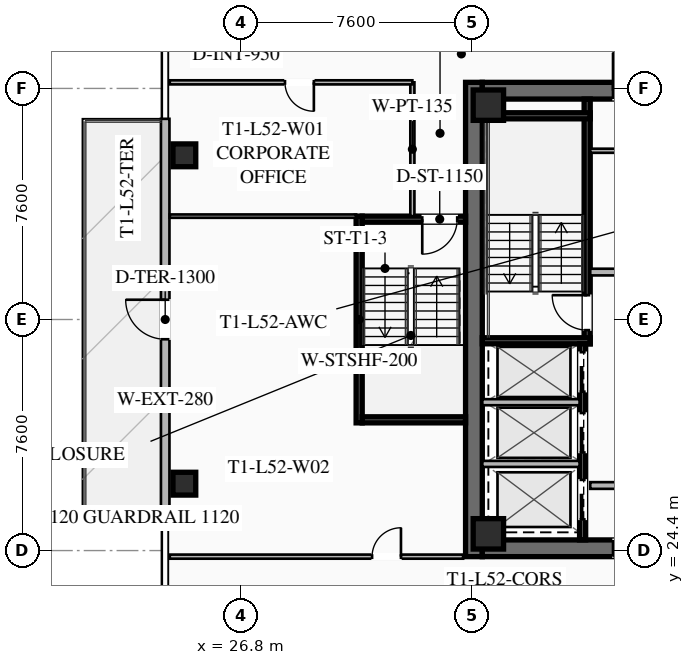
"""IFC4 building model, lengths in metres.
Left out: names, types, materials, properties, quantities, classifications, styles, units other than length and angle.
Written with IfcOpenShell. Run it as: python <this file> out.ifc"""

import sys

from ifc_helpers import new_model, si_unit, direction, frame, frame_2d, origin, origin_2d, place, context, subcontext, project, spatial, rectangle, hollow_rectangle, extrude, element, fill, save


model = new_model("IFC4")
c1 = context("Model", 3, precision=1e-05, world=origin(), true_north=direction((0.0, 1.0)))
c2 = subcontext(c1, "Body", "Model", "MODEL_VIEW")
j1 = project(units=[si_unit("LENGTHUNIT", "METRE"), si_unit("PLANEANGLEUNIT", "RADIAN")], contexts=[c1])
p1 = place(None, origin())
s1 = spatial("IfcSite", under=j1, at=p1, CompositionType="ELEMENT")
p2 = place(p1, origin())
s2 = spatial("IfcBuilding", under=s1, at=p2, CompositionType="ELEMENT")
p3 = place(p2, frame((0.0, 0.0, 192.5)))
s3 = spatial("IfcBuildingStorey", under=s2, at=p3, CompositionType="ELEMENT", Elevation=192.5)
p4 = place(p3, frame((34.475, 24.2, 0.0), z_axis=(0.0, 0.0, 1.0), x_axis=(0.0, 1.0, 0.0)))
e1 = element("IfcWall", 1, at=p4, inside=s3, PredefinedType="SHEAR", context=c2, shape_type="SweptSolid", body=[
    extrude(rectangle(XDim=15.6, YDim=0.55, at=frame_2d((7.8, 0.0))), origin(), (0.0, 0.0, 1.0), 3.55),
])
p5 = place(p3, frame((49.25, 24.475, 0.0), z_axis=(0.0, 0.0, 1.0), x_axis=(-1.0, 0.0, 0.0)))
e2 = element("IfcWall", 2, at=p5, inside=s3, PredefinedType="SHEAR", context=c2, shape_type="SweptSolid", body=[
    extrude(rectangle(XDim=14.5, YDim=0.55, at=frame_2d((7.25, 0.0))), origin(), (0.0, 0.0, 1.0), 3.55),
])
p6 = place(p5, frame((8.95, 0.0, 0.0)))
e3 = element("IfcOpeningElement", 3, at=p6, cuts=e2, PredefinedType="OPENING", context=c2, shape_type="SweptSolid", body=[
    extrude(rectangle(XDim=1.25, YDim=2.25, at=frame_2d((0.625, 1.125))), frame((0.0, 0.285, 0.0), z_axis=(0.0, -1.0, 0.0), x_axis=(1.0, 0.0, 0.0)), (0.0, 0.0, 1.0), 0.57),
])
p7 = place(p5, frame((3.9, 0.0, 0.0)))
e4 = element("IfcOpeningElement", 4, at=p7, cuts=e2, PredefinedType="OPENING", context=c2, shape_type="SweptSolid", body=[
    extrude(rectangle(XDim=1.25, YDim=2.25, at=frame_2d((0.625, 1.125))), frame((0.0, 0.285, 0.0), z_axis=(0.0, -1.0, 0.0), x_axis=(1.0, 0.0, 0.0)), (0.0, 0.0, 1.0), 0.57),
])
p8 = place(p3, frame((34.75, 39.525, 0.0), z_axis=(0.0, 0.0, 1.0), x_axis=(1.0, 0.0, 0.0)))
e5 = element("IfcWall", 5, at=p8, inside=s3, PredefinedType="SHEAR", context=c2, shape_type="SweptSolid", body=[
    extrude(rectangle(XDim=14.5, YDim=0.55, at=frame_2d((7.25, 0.0))), origin(), (0.0, 0.0, 1.0), 3.55),
])
p9 = place(p8, frame((4.3, 0.0, 0.0)))
e6 = element("IfcOpeningElement", 6, at=p9, cuts=e5, PredefinedType="OPENING", context=c2, shape_type="SweptSolid", body=[
    extrude(rectangle(XDim=1.25, YDim=2.25, at=frame_2d((0.625, 1.125))), frame((0.0, 0.285, 0.0), z_axis=(0.0, -1.0, 0.0), x_axis=(1.0, 0.0, 0.0)), (0.0, 0.0, 1.0), 0.57),
])
p10 = place(p8, frame((9.35, 0.0, 0.0)))
e7 = element("IfcOpeningElement", 7, at=p10, cuts=e5, PredefinedType="OPENING", context=c2, shape_type="SweptSolid", body=[
    extrude(rectangle(XDim=1.25, YDim=2.25, at=frame_2d((0.625, 1.125))), frame((0.0, 0.285, 0.0), z_axis=(0.0, -1.0, 0.0), x_axis=(1.0, 0.0, 0.0)), (0.0, 0.0, 1.0), 0.57),
])
for number, where, z_axis, x_axis in (
    (8, (34.95, 24.95, 0.0), (0.0, 0.0, 1.0), (1.0, 0.0, 0.0)),
    (9, (34.95, 39.05, 0.0), (0.0, 0.0, 1.0), (1.0, 0.0, 0.0)),
):
    element("IfcColumn", number, at=place(p3, frame(where, z_axis=z_axis, x_axis=x_axis)), inside=s3, PredefinedType="COLUMN", context=c2, shape_type="SweptSolid", body=[
        extrude(hollow_rectangle(XDim=1.0, YDim=1.0, WallThickness=0.04, at=origin_2d()), origin(), (0.0, 0.0, 1.0), 3.37),
    ])
for number, where, z_axis, x_axis in (
    (10, (24.95, 37.4, 0.0), (0.0, 0.0, 1.0), (1.0, 0.0, 0.0)),
    (11, (24.95, 26.6, 0.0), (0.0, 0.0, 1.0), (1.0, 0.0, 0.0)),
):
    element("IfcColumn", number, at=place(p3, frame(where, z_axis=z_axis, x_axis=x_axis)), inside=s3, PredefinedType="COLUMN", context=c2, shape_type="SweptSolid", body=[
        extrude(hollow_rectangle(XDim=0.75, YDim=0.75, WallThickness=0.032, at=origin_2d()), origin(), (0.0, 0.0, 1.0), 3.37),
    ])
p11 = place(p3, frame((24.32, 25.4, 0.0), z_axis=(0.0, 0.0, 1.0), x_axis=(0.0, 1.0, 0.0)))
e12 = element("IfcWall", 12, at=p11, inside=s3, PredefinedType="SOLIDWALL", context=c2, shape_type="SweptSolid", body=[
    extrude(rectangle(XDim=13.2, YDim=0.28, at=frame_2d((6.6, 0.0))), origin(), (0.0, 0.0, 1.0), 3.37),
])
p12 = place(p11, frame((5.95, 0.0, 0.0)))
e13 = element("IfcOpeningElement", 13, at=p12, cuts=e12, PredefinedType="OPENING", context=c2, shape_type="SweptSolid", body=[
    extrude(rectangle(XDim=1.3, YDim=2.15, at=frame_2d((0.65, 1.075))), frame((0.0, 0.15, 0.0), z_axis=(0.0, -1.0, 0.0), x_axis=(1.0, 0.0, 0.0)), (0.0, 0.0, 1.0), 0.3),
])
p13 = place(p3, frame((38.2, 31.2, 0.0), z_axis=(0.0, 0.0, 1.0), x_axis=(0.0, 1.0, 0.0)))
e14 = element("IfcWall", 14, at=p13, inside=s3, PredefinedType="SHEAR", context=c2, shape_type="SweptSolid", body=[
    extrude(rectangle(XDim=8.05, YDim=0.2, at=frame_2d((4.025, 0.0))), origin(), (0.0, 0.0, 1.0), 3.37),
])
p14 = place(p13, frame((0.45, 0.0, 0.0)))
e15 = element("IfcOpeningElement", 15, at=p14, cuts=e14, PredefinedType="OPENING", context=c2, shape_type="SweptSolid", body=[
    extrude(rectangle(XDim=1.15, YDim=2.2, at=frame_2d((0.575, 1.1))), frame((0.0, 0.11, 0.0), z_axis=(0.0, -1.0, 0.0), x_axis=(1.0, 0.0, 0.0)), (0.0, 0.0, 1.0), 0.22),
])
for number, where, z_axis, x_axis in (
    (16, (34.75, 31.3, 0.0), (0.0, 0.0, 1.0), (1.0, 0.0, 0.0)),
    (17, (34.75, 38.7, 0.0), (0.0, 0.0, 1.0), (1.0, 0.0, 0.0)),
):
    element("IfcWall", number, at=place(p3, frame(where, z_axis=z_axis, x_axis=x_axis)), inside=s3, PredefinedType="SHEAR", context=c2, shape_type="SweptSolid", body=[
        extrude(rectangle(XDim=3.55, YDim=0.2, at=frame_2d((1.775, 0.0))), origin(), (0.0, 0.0, 1.0), 3.37),
    ])
p15 = place(p3, frame((38.3, 33.56, 0.0), z_axis=(0.0, 0.0, 1.0), x_axis=(1.0, 0.0, 0.0)))
e18 = element("IfcWall", 18, at=p15, inside=s3, PredefinedType="SOLIDWALL", context=c2, shape_type="SweptSolid", body=[
    extrude(rectangle(XDim=3.15, YDim=0.22, at=frame_2d((1.575, 0.0))), origin(), (0.0, 0.0, 1.0), 2.723),
])
p16 = place(p3, frame((38.3, 26.54, 0.0), z_axis=(0.0, 0.0, 1.0), x_axis=(1.0, 0.0, 0.0)))
e19 = element("IfcWall", 19, at=p16, inside=s3, PredefinedType="SOLIDWALL", context=c2, shape_type="SweptSolid", body=[
    extrude(rectangle(XDim=3.15, YDim=0.22, at=frame_2d((1.575, 0.0))), origin(), (0.0, 0.0, 1.0), 2.723),
])
p17 = place(p16, frame((0.95, 0.0, 0.0)))
e20 = element("IfcOpeningElement", 20, at=p17, cuts=e19, PredefinedType="OPENING", context=c2, shape_type="SweptSolid", body=[
    extrude(rectangle(XDim=1.25, YDim=2.25, at=frame_2d((0.625, 1.125))), frame((0.0, 0.12, 0.0), z_axis=(0.0, -1.0, 0.0), x_axis=(1.0, 0.0, 0.0)), (0.0, 0.0, 1.0), 0.24),
])
p18 = place(p3, frame((38.05, 24.75, 0.0), z_axis=(0.0, 0.0, 1.0), x_axis=(0.0, 1.0, 0.0)))
e21 = element("IfcWall", 21, at=p18, inside=s3, PredefinedType="SHEAR", context=c2, shape_type="SweptSolid", body=[
    extrude(rectangle(XDim=6.45, YDim=0.2, at=frame_2d((3.225, 0.0))), origin(), (0.0, 0.0, 1.0), 3.37),
])
p19 = place(p18, frame((4.875, 0.0, 0.0)))
e22 = element("IfcOpeningElement", 22, at=p19, cuts=e21, PredefinedType="OPENING", context=c2, shape_type="SweptSolid", body=[
    extrude(rectangle(XDim=1.3, YDim=2.25, at=frame_2d((0.65, 1.125))), frame((0.0, 0.11, 0.0), z_axis=(0.0, -1.0, 0.0), x_axis=(1.0, 0.0, 0.0)), (0.0, 0.0, 1.0), 0.22),
])
p20 = place(p18, frame((2.875, 0.0, 0.0)))
e23 = element("IfcOpeningElement", 23, at=p20, cuts=e21, PredefinedType="OPENING", context=c2, shape_type="SweptSolid", body=[
    extrude(rectangle(XDim=1.3, YDim=2.25, at=frame_2d((0.65, 1.125))), frame((0.0, 0.11, 0.0), z_axis=(0.0, -1.0, 0.0), x_axis=(1.0, 0.0, 0.0)), (0.0, 0.0, 1.0), 0.22),
])
p21 = place(p18, frame((0.675, 0.0, 0.0)))
e24 = element("IfcOpeningElement", 24, at=p21, cuts=e21, PredefinedType="OPENING", context=c2, shape_type="SweptSolid", body=[
    extrude(rectangle(XDim=1.3, YDim=2.25, at=frame_2d((0.65, 1.125))), frame((0.0, 0.11, 0.0), z_axis=(0.0, -1.0, 0.0), x_axis=(1.0, 0.0, 0.0)), (0.0, 0.0, 1.0), 0.22),
])
for number, where, z_axis, x_axis in (
    (25, (34.75, 27.25, 0.0), (0.0, 0.0, 1.0), (1.0, 0.0, 0.0)),
    (26, (34.75, 29.28, 0.0), (0.0, 0.0, 1.0), (1.0, 0.0, 0.0)),
):
    element("IfcWall", number, at=place(p3, frame(where, z_axis=z_axis, x_axis=x_axis)), inside=s3, PredefinedType="SOLIDWALL", context=c2, shape_type="SweptSolid", body=[
        extrude(rectangle(XDim=3.2, YDim=0.2, at=frame_2d((1.6, 0.0))), origin(), (0.0, 0.0, 1.0), 3.37),
    ])
p22 = place(p3, frame((38.3, 37.55, 0.0), z_axis=(0.0, 0.0, 1.0), x_axis=(1.0, 0.0, 0.0)))
e27 = element("IfcWall", 27, at=p22, inside=s3, PredefinedType="PARTITIONING", context=c2, shape_type="SweptSolid", body=[
    extrude(rectangle(XDim=3.15, YDim=0.135, at=frame_2d((1.575, 0.0))), origin(), (0.0, 0.0, 1.0), 2.723),
])
p23 = place(p22, frame((1.05, 0.0, 0.0)))
e28 = element("IfcOpeningElement", 28, at=p23, cuts=e27, PredefinedType="OPENING", context=c2, shape_type="SweptSolid", body=[
    extrude(rectangle(XDim=1.05, YDim=2.2, at=frame_2d((0.525, 1.1))), frame((0.0, 0.077, 0.0), z_axis=(0.0, -1.0, 0.0), x_axis=(1.0, 0.0, 0.0)), (0.0, 0.0, 1.0), 0.155),
])
p24 = place(p3, frame((30.7, 28.6, 0.0), z_axis=(0.0, 0.0, 1.0), x_axis=(0.0, 1.0, 0.0)))
e29 = element("IfcWall", 29, at=p24, inside=s3, PredefinedType="SHEAR", context=c2, shape_type="SweptSolid", body=[
    extrude(rectangle(XDim=6.8, YDim=0.2, at=frame_2d((3.4, 0.0))), origin(), (0.0, 0.0, 1.0), 3.37),
])
p25 = place(p3, frame((34.2, 35.3, 0.0), z_axis=(0.0, 0.0, 1.0), x_axis=(-1.0, 0.0, 0.0)))
e30 = element("IfcWall", 30, at=p25, inside=s3, PredefinedType="SHEAR", context=c2, shape_type="SweptSolid", body=[
    extrude(rectangle(XDim=3.4, YDim=0.2, at=frame_2d((1.7, 0.0))), origin(), (0.0, 0.0, 1.0), 3.37),
])
p26 = place(p25, frame((0.275, 0.0, 0.0)))
e31 = element("IfcOpeningElement", 31, at=p26, cuts=e30, PredefinedType="OPENING", context=c2, shape_type="SweptSolid", body=[
    extrude(rectangle(XDim=1.15, YDim=2.2, at=frame_2d((0.575, 1.1))), frame((0.0, 0.11, 0.0), z_axis=(0.0, -1.0, 0.0), x_axis=(1.0, 0.0, 0.0)), (0.0, 0.0, 1.0), 0.22),
])
p27 = place(p3, frame((30.8, 28.7, 0.0), z_axis=(0.0, 0.0, 1.0), x_axis=(1.0, 0.0, 0.0)))
e32 = element("IfcWall", 32, at=p27, inside=s3, PredefinedType="SHEAR", context=c2, shape_type="SweptSolid", body=[
    extrude(rectangle(XDim=3.4, YDim=0.2, at=frame_2d((1.7, 0.0))), origin(), (0.0, 0.0, 1.0), 3.37),
])
p28 = place(p3, frame((32.45, 35.4, 0.0), z_axis=(0.0, 0.0, 1.0), x_axis=(0.0, 1.0, 0.0)))
e33 = element("IfcWall", 33, at=p28, inside=s3, PredefinedType="PARTITIONING", context=c2, shape_type="SweptSolid", body=[
    extrude(rectangle(XDim=4.4, YDim=0.135, at=frame_2d((2.2, 0.0))), origin(), (0.0, 0.0, 1.0), 2.723),
])
p29 = place(p3, frame((32.45, 39.8, 0.0), z_axis=(0.0, 0.0, 1.0), x_axis=(-1.0, 0.0, 0.0)))
e34 = element("IfcWall", 34, at=p29, inside=s3, PredefinedType="PARTITIONING", context=c2, shape_type="SweptSolid", body=[
    extrude(rectangle(XDim=7.98, YDim=0.135, at=frame_2d((3.99, 0.0))), origin(), (0.0, 0.0, 1.0), 2.723),
])
p30 = place(p29, frame((3.24, 0.0, 0.0)))
e35 = element("IfcOpeningElement", 35, at=p30, cuts=e34, PredefinedType="OPENING", context=c2, shape_type="SweptSolid", body=[
    extrude(rectangle(XDim=0.95, YDim=2.05, at=frame_2d((0.475, 1.025))), frame((0.0, 0.077, 0.0), z_axis=(0.0, -1.0, 0.0), x_axis=(1.0, 0.0, 0.0)), (0.0, 0.0, 1.0), 0.155),
])
p31 = place(p3, frame((24.47, 24.2, 0.0), z_axis=(0.0, 0.0, 1.0), x_axis=(1.0, 0.0, 0.0)))
e36 = element("IfcWall", 36, at=p31, inside=s3, PredefinedType="PARTITIONING", context=c2, shape_type="SweptSolid", body=[
    extrude(rectangle(XDim=9.65, YDim=0.135, at=frame_2d((4.825, 0.0))), origin(), (0.0, 0.0, 1.0), 2.723),
])
p32 = place(p31, frame((6.655, 0.0, 0.0)))
e37 = element("IfcOpeningElement", 37, at=p32, cuts=e36, PredefinedType="OPENING", context=c2, shape_type="SweptSolid", body=[
    extrude(rectangle(XDim=0.95, YDim=2.05, at=frame_2d((0.475, 1.025))), frame((0.0, 0.077, 0.0), z_axis=(0.0, -1.0, 0.0), x_axis=(1.0, 0.0, 0.0)), (0.0, 0.0, 1.0), 0.155),
])
p33 = place(p3, frame((30.6, 35.4, 0.0), z_axis=(0.0, 0.0, 1.0), x_axis=(-1.0, 0.0, 0.0)))
e38 = element("IfcWall", 38, at=p33, inside=s3, PredefinedType="PARTITIONING", context=c2, shape_type="SweptSolid", body=[
    extrude(rectangle(XDim=6.13, YDim=0.11, at=frame_2d((3.065, 0.0))), origin(), (0.0, 0.0, 1.0), 2.723),
])
p34 = place(p12, origin())
e39 = element("IfcDoor", 39, at=p34, inside=s3, OperationType="SINGLE_SWING_RIGHT", PredefinedType="DOOR", context=c2, shape_type="SweptSolid", body=[
    extrude(rectangle(XDim=1.3, YDim=2.15, at=frame_2d((0.65, 1.075))), frame((0.0, 0.025, 0.0), z_axis=(0.0, -1.0, 0.0), x_axis=(1.0, 0.0, 0.0)), (0.0, 0.0, 1.0), 0.05),
])
fill(e13, e39)
p35 = place(p9, origin())
e40 = element("IfcDoor", 40, at=p35, inside=s3, OperationType="SINGLE_SWING_LEFT", PredefinedType="DOOR", context=c2, shape_type="SweptSolid", body=[
    extrude(rectangle(XDim=1.25, YDim=2.25, at=frame_2d((0.625, 1.125))), frame((0.0, 0.025, 0.0), z_axis=(0.0, -1.0, 0.0), x_axis=(1.0, 0.0, 0.0)), (0.0, 0.0, 1.0), 0.05),
])
fill(e6, e40)
p36 = place(p6, origin())
e41 = element("IfcDoor", 41, at=p36, inside=s3, OperationType="SINGLE_SWING_LEFT", PredefinedType="DOOR", context=c2, shape_type="SweptSolid", body=[
    extrude(rectangle(XDim=1.25, YDim=2.25, at=frame_2d((0.625, 1.125))), frame((0.0, 0.025, 0.0), z_axis=(0.0, -1.0, 0.0), x_axis=(1.0, 0.0, 0.0)), (0.0, 0.0, 1.0), 0.05),
])
fill(e3, e41)
p37 = place(p14, origin())
e42 = element("IfcDoor", 42, at=p37, inside=s3, OperationType="SINGLE_SWING_RIGHT", PredefinedType="DOOR", context=c2, shape_type="SweptSolid", body=[
    extrude(rectangle(XDim=1.15, YDim=2.2, at=frame_2d((0.575, 1.1))), frame((0.0, 0.025, 0.0), z_axis=(0.0, -1.0, 0.0), x_axis=(1.0, 0.0, 0.0)), (0.0, 0.0, 1.0), 0.05),
])
fill(e15, e42)
p38 = place(p26, origin())
e43 = element("IfcDoor", 43, at=p38, inside=s3, OperationType="SINGLE_SWING_RIGHT", PredefinedType="DOOR", context=c2, shape_type="SweptSolid", body=[
    extrude(rectangle(XDim=1.15, YDim=2.2, at=frame_2d((0.575, 1.1))), frame((0.0, 0.025, 0.0), z_axis=(0.0, -1.0, 0.0), x_axis=(1.0, 0.0, 0.0)), (0.0, 0.0, 1.0), 0.05),
])
fill(e31, e43)
p39 = place(p30, origin())
e44 = element("IfcDoor", 44, at=p39, inside=s3, OperationType="SINGLE_SWING_LEFT", PredefinedType="DOOR", context=c2, shape_type="SweptSolid", body=[
    extrude(rectangle(XDim=0.95, YDim=2.05, at=frame_2d((0.475, 1.025))), frame((0.0, 0.025, 0.0), z_axis=(0.0, -1.0, 0.0), x_axis=(1.0, 0.0, 0.0)), (0.0, 0.0, 1.0), 0.05),
])
fill(e35, e44)
p40 = place(p32, origin())
e45 = element("IfcDoor", 45, at=p40, inside=s3, OperationType="SINGLE_SWING_RIGHT", PredefinedType="DOOR", context=c2, shape_type="SweptSolid", body=[
    extrude(rectangle(XDim=0.95, YDim=2.05, at=frame_2d((0.475, 1.025))), frame((0.0, 0.025, 0.0), z_axis=(0.0, -1.0, 0.0), x_axis=(1.0, 0.0, 0.0)), (0.0, 0.0, 1.0), 0.05),
])
fill(e37, e45)
p41 = place(p19, origin())
e46 = element("IfcDoor", 46, at=p41, inside=s3, OperationType="SLIDING_TO_LEFT", PredefinedType="DOOR", context=c2, shape_type="SweptSolid", body=[
    extrude(rectangle(XDim=1.3, YDim=2.25, at=frame_2d((0.65, 1.125))), frame((0.0, 0.025, 0.0), z_axis=(0.0, -1.0, 0.0), x_axis=(1.0, 0.0, 0.0)), (0.0, 0.0, 1.0), 0.05),
])
fill(e22, e46)
p42 = place(p20, origin())
e47 = element("IfcDoor", 47, at=p42, inside=s3, OperationType="SLIDING_TO_LEFT", PredefinedType="DOOR", context=c2, shape_type="SweptSolid", body=[
    extrude(rectangle(XDim=1.3, YDim=2.25, at=frame_2d((0.65, 1.125))), frame((0.0, 0.025, 0.0), z_axis=(0.0, -1.0, 0.0), x_axis=(1.0, 0.0, 0.0)), (0.0, 0.0, 1.0), 0.05),
])
fill(e23, e47)
p43 = place(p21, origin())
e48 = element("IfcDoor", 48, at=p43, inside=s3, OperationType="SLIDING_TO_LEFT", PredefinedType="DOOR", context=c2, shape_type="SweptSolid", body=[
    extrude(rectangle(XDim=1.3, YDim=2.25, at=frame_2d((0.65, 1.125))), frame((0.0, 0.025, 0.0), z_axis=(0.0, -1.0, 0.0), x_axis=(1.0, 0.0, 0.0)), (0.0, 0.0, 1.0), 0.05),
])
fill(e24, e48)
save(model, sys.argv[1])
